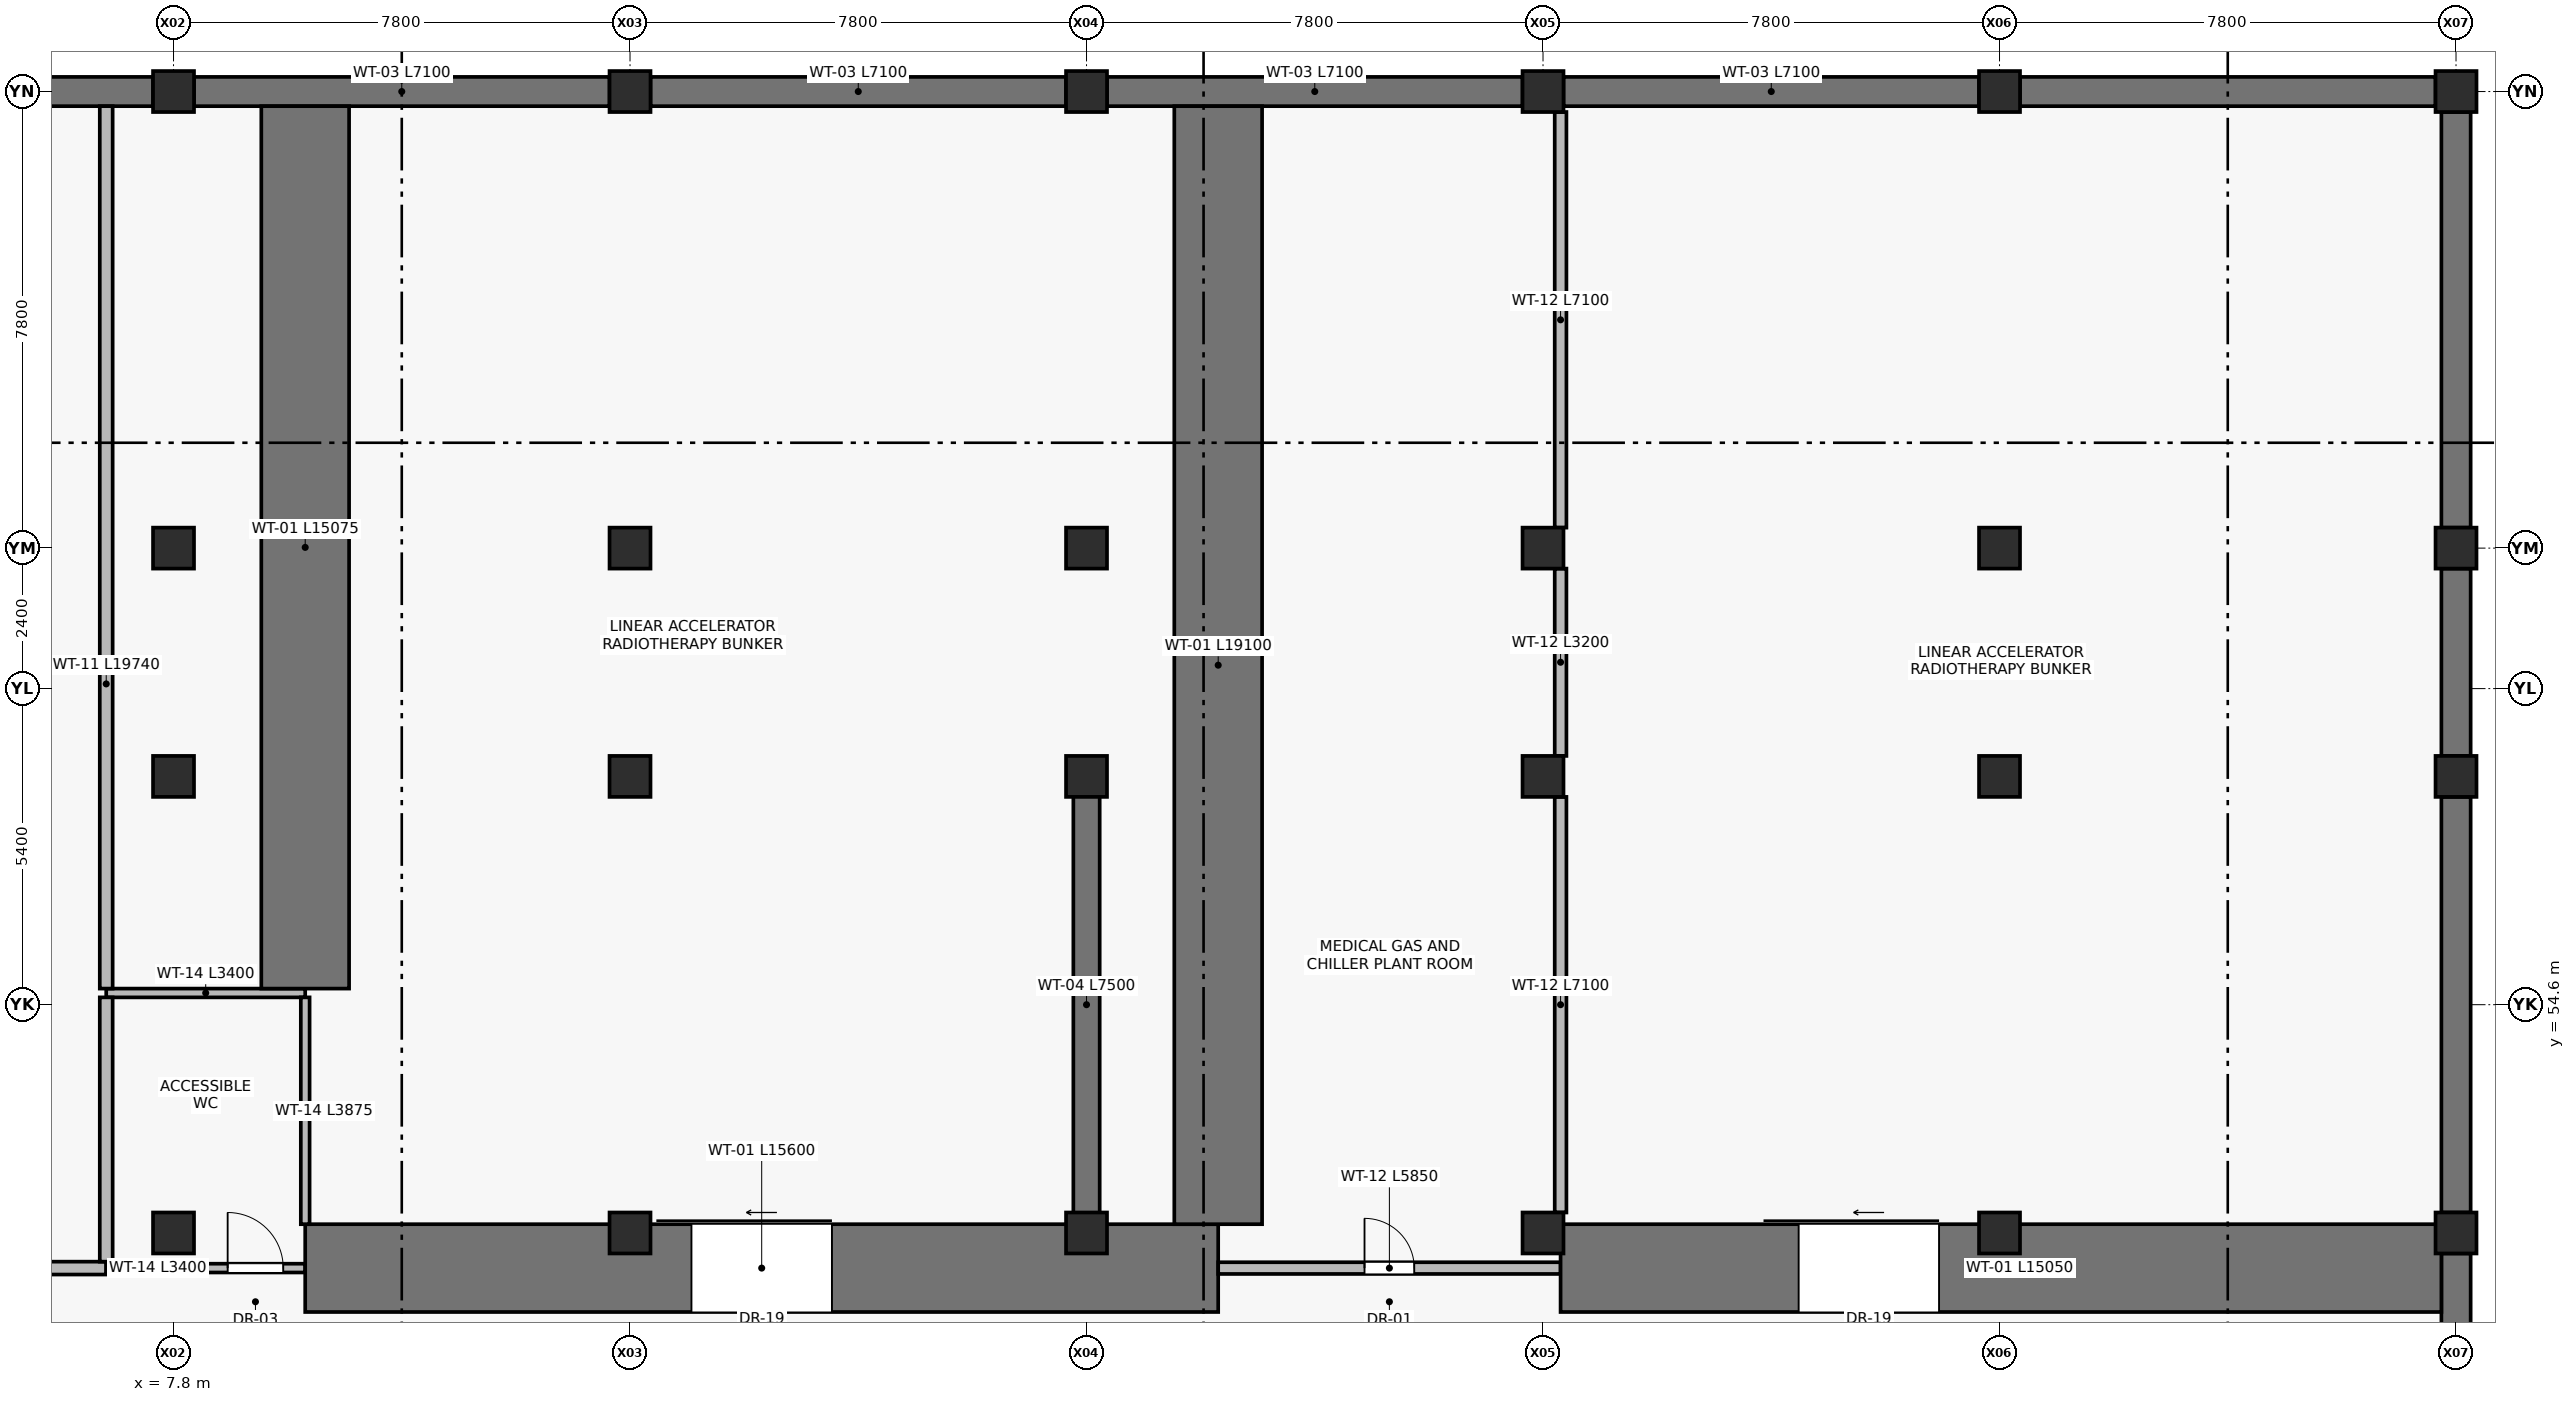
"""IFC4 building model, lengths in metres.
Left out: names, types, materials, properties, quantities, classifications, styles, units other than length and angle.
Written with IfcOpenShell. Run it as: python <this file> out.ifc"""

import sys

from ifc_helpers import new_model, si_unit, direction, frame, frame_2d, origin, origin_2d, place, context, subcontext, project, spatial, rectangle, extrude, element, fill, save


model = new_model("IFC4")
c1 = context("Model", 3, precision=1e-05, world=origin(), true_north=direction((0.0, 1.0)))
c2 = subcontext(c1, "Body", "Model", "MODEL_VIEW")
j1 = project(units=[si_unit("LENGTHUNIT", "METRE"), si_unit("PLANEANGLEUNIT", "RADIAN")], contexts=[c1])
p1 = place(None, origin())
s1 = spatial("IfcSite", under=j1, at=p1, CompositionType="ELEMENT")
p2 = place(p1, origin())
s2 = spatial("IfcBuilding", under=s1, at=p2, CompositionType="ELEMENT")
p3 = place(p2, frame((0.0, 0.0, -4.5)))
s3 = spatial("IfcBuildingStorey", under=s2, at=p3, CompositionType="ELEMENT", Elevation=-4.5)
for number, where, z_axis, x_axis in (
    (1, (7.8, 50.7, 0.0), (0.0, 0.0, 1.0), (1.0, 0.0, 0.0)),
    (2, (7.8, 58.5, 0.0), (0.0, 0.0, 1.0), (1.0, 0.0, 0.0)),
    (3, (7.8, 62.4, 0.0), (0.0, 0.0, 1.0), (1.0, 0.0, 0.0)),
    (4, (7.8, 70.2, 0.0), (0.0, 0.0, 1.0), (1.0, 0.0, 0.0)),
    (5, (15.6, 50.7, 0.0), (0.0, 0.0, 1.0), (1.0, 0.0, 0.0)),
    (6, (15.6, 58.5, 0.0), (0.0, 0.0, 1.0), (1.0, 0.0, 0.0)),
    (7, (15.6, 62.4, 0.0), (0.0, 0.0, 1.0), (1.0, 0.0, 0.0)),
    (8, (15.6, 70.2, 0.0), (0.0, 0.0, 1.0), (1.0, 0.0, 0.0)),
    (9, (23.4, 50.7, 0.0), (0.0, 0.0, 1.0), (1.0, 0.0, 0.0)),
    (10, (23.4, 58.5, 0.0), (0.0, 0.0, 1.0), (1.0, 0.0, 0.0)),
    (11, (23.4, 62.4, 0.0), (0.0, 0.0, 1.0), (1.0, 0.0, 0.0)),
    (12, (23.4, 70.2, 0.0), (0.0, 0.0, 1.0), (1.0, 0.0, 0.0)),
    (13, (31.2, 50.7, 0.0), (0.0, 0.0, 1.0), (1.0, 0.0, 0.0)),
    (14, (31.2, 58.5, 0.0), (0.0, 0.0, 1.0), (1.0, 0.0, 0.0)),
    (15, (31.2, 62.4, 0.0), (0.0, 0.0, 1.0), (1.0, 0.0, 0.0)),
    (16, (31.2, 70.2, 0.0), (0.0, 0.0, 1.0), (1.0, 0.0, 0.0)),
    (17, (39.0, 50.7, 0.0), (0.0, 0.0, 1.0), (1.0, 0.0, 0.0)),
    (18, (39.0, 58.5, 0.0), (0.0, 0.0, 1.0), (1.0, 0.0, 0.0)),
    (19, (39.0, 62.4, 0.0), (0.0, 0.0, 1.0), (1.0, 0.0, 0.0)),
    (20, (39.0, 70.2, 0.0), (0.0, 0.0, 1.0), (1.0, 0.0, 0.0)),
    (21, (46.8, 50.7, 0.0), (0.0, 0.0, 1.0), (1.0, 0.0, 0.0)),
    (22, (46.8, 58.5, 0.0), (0.0, 0.0, 1.0), (1.0, 0.0, 0.0)),
    (23, (46.8, 62.4, 0.0), (0.0, 0.0, 1.0), (1.0, 0.0, 0.0)),
    (24, (46.8, 70.2, 0.0), (0.0, 0.0, 1.0), (1.0, 0.0, 0.0)),
):
    element("IfcColumn", number, at=place(p3, frame(where, z_axis=z_axis, x_axis=x_axis)), inside=s3, PredefinedType="COLUMN", context=c2, shape_type="SweptSolid", body=[
        extrude(rectangle(XDim=0.7, YDim=0.7, at=origin_2d()), origin(), (0.0, 0.0, 1.0), 4.5),
    ])
p4 = place(p3, frame((0.35, 70.2, 0.0), z_axis=(0.0, 0.0, 1.0), x_axis=(1.0, 0.0, 0.0)))
e25 = element("IfcWall", 25, at=p4, inside=s3, PredefinedType="SOLIDWALL", context=c2, shape_type="SweptSolid", body=[
    extrude(rectangle(XDim=7.1, YDim=0.5, at=frame_2d((3.55, 0.0))), origin(), (0.0, 0.0, 1.0), 4.12),
])
for number, where, z_axis, x_axis in (
    (26, (8.15, 70.2, 0.0), (0.0, 0.0, 1.0), (1.0, 0.0, 0.0)),
    (27, (15.95, 70.2, 0.0), (0.0, 0.0, 1.0), (1.0, 0.0, 0.0)),
    (28, (23.75, 70.2, 0.0), (0.0, 0.0, 1.0), (1.0, 0.0, 0.0)),
):
    element("IfcWall", number, at=place(p3, frame(where, z_axis=z_axis, x_axis=x_axis)), inside=s3, PredefinedType="SOLIDWALL", context=c2, shape_type="SweptSolid", body=[
        extrude(rectangle(XDim=7.1, YDim=0.5, at=frame_2d((3.55, 0.0))), origin(), (0.0, 0.0, 1.0), 4.12),
    ])
for number, where, z_axis, x_axis in (
    (29, (31.55, 70.2, 0.0), (0.0, 0.0, 1.0), (1.0, 0.0, 0.0)),
    (30, (39.35, 70.2, 0.0), (0.0, 0.0, 1.0), (1.0, 0.0, 0.0)),
):
    element("IfcWall", number, at=place(p3, frame(where, z_axis=z_axis, x_axis=x_axis)), inside=s3, PredefinedType="SOLIDWALL", context=c2, shape_type="SweptSolid", body=[
        extrude(rectangle(XDim=7.1, YDim=0.5, at=frame_2d((3.55, 0.0))), origin(), (0.0, 0.0, 1.0), 4.12),
    ])
p5 = place(p3, frame((46.8, 69.85, 0.0), z_axis=(0.0, 0.0, 1.0), x_axis=(0.0, -1.0, 0.0)))
e31 = element("IfcWall", 31, at=p5, inside=s3, PredefinedType="SOLIDWALL", context=c2, shape_type="SweptSolid", body=[
    extrude(rectangle(XDim=7.1, YDim=0.5, at=frame_2d((3.55, 0.0))), origin(), (0.0, 0.0, 1.0), 4.12),
])
p6 = place(p3, frame((46.8, 62.05, 0.0), z_axis=(0.0, 0.0, 1.0), x_axis=(0.0, -1.0, 0.0)))
e32 = element("IfcWall", 32, at=p6, inside=s3, PredefinedType="SOLIDWALL", context=c2, shape_type="SweptSolid", body=[
    extrude(rectangle(XDim=3.2, YDim=0.5, at=frame_2d((1.6, 0.0))), origin(), (0.0, 0.0, 1.0), 4.12),
])
p7 = place(p3, frame((46.8, 58.15, 0.0), z_axis=(0.0, 0.0, 1.0), x_axis=(0.0, -1.0, 0.0)))
e33 = element("IfcWall", 33, at=p7, inside=s3, PredefinedType="SOLIDWALL", context=c2, shape_type="SweptSolid", body=[
    extrude(rectangle(XDim=7.1, YDim=0.5, at=frame_2d((3.55, 0.0))), origin(), (0.0, 0.0, 1.0), 4.12),
])
p8 = place(p3, frame((46.8, 50.35, 0.0), z_axis=(0.0, 0.0, 1.0), x_axis=(0.0, -1.0, 0.0)))
e34 = element("IfcWall", 34, at=p8, inside=s3, PredefinedType="SOLIDWALL", context=c2, shape_type="SweptSolid", body=[
    extrude(rectangle(XDim=7.1, YDim=0.5, at=frame_2d((3.55, 0.0))), origin(), (0.0, 0.0, 1.0), 4.12),
])
p9 = place(p3, frame((23.4, 50.85, 0.0), z_axis=(0.0, 0.0, 1.0), x_axis=(0.0, 1.0, 0.0)))
e35 = element("IfcWall", 35, at=p9, inside=s3, PredefinedType="SHEAR", context=c2, shape_type="SweptSolid", body=[
    extrude(rectangle(XDim=7.5, YDim=0.45, at=frame_2d((3.75, 0.0))), origin(), (0.0, 0.0, 1.0), 4.12),
])
p10 = place(p3, frame((0.25, 50.1, 0.0), z_axis=(0.0, 0.0, 1.0), x_axis=(1.0, 0.0, 0.0)))
e36 = element("IfcWall", 36, at=p10, inside=s3, PredefinedType="PARTITIONING", context=c2, shape_type="SweptSolid", body=[
    extrude(rectangle(XDim=6.4, YDim=0.22, at=frame_2d((3.2, 0.0))), origin(), (0.0, 0.0, 1.0), 4.12),
])
p11 = place(p10, frame((2.75, 0.0, 0.0)))
e37 = element("IfcOpeningElement", 37, at=p11, cuts=e36, PredefinedType="OPENING", context=c2, shape_type="SweptSolid", body=[
    extrude(rectangle(XDim=0.9, YDim=2.1, at=frame_2d((0.45, 1.05))), frame((0.0, 0.12, 0.0), z_axis=(0.0, -1.0, 0.0), x_axis=(1.0, 0.0, 0.0)), (0.0, 0.0, 1.0), 0.24),
])
p12 = place(p3, frame((6.65, 50.1, 0.0), z_axis=(0.0, 0.0, 1.0), x_axis=(1.0, 0.0, 0.0)))
e38 = element("IfcWall", 38, at=p12, inside=s3, PredefinedType="PARTITIONING", context=c2, shape_type="SweptSolid", body=[
    extrude(rectangle(XDim=3.4, YDim=0.15, at=frame_2d((1.7, 0.0))), origin(), (0.0, 0.0, 1.0), 4.12),
])
p13 = place(p12, frame((2.075, 0.0, 0.0)))
e39 = element("IfcOpeningElement", 39, at=p13, cuts=e38, PredefinedType="OPENING", context=c2, shape_type="SweptSolid", body=[
    extrude(rectangle(XDim=0.95, YDim=2.1, at=frame_2d((0.475, 1.05))), frame((0.0, 0.085, 0.0), z_axis=(0.0, -1.0, 0.0), x_axis=(1.0, 0.0, 0.0)), (0.0, 0.0, 1.0), 0.17),
])
p14 = place(p3, frame((6.65, 54.8, 0.0), z_axis=(0.0, 0.0, 1.0), x_axis=(1.0, 0.0, 0.0)))
e40 = element("IfcWall", 40, at=p14, inside=s3, PredefinedType="PARTITIONING", context=c2, shape_type="SweptSolid", body=[
    extrude(rectangle(XDim=3.4, YDim=0.15, at=frame_2d((1.7, 0.0))), origin(), (0.0, 0.0, 1.0), 4.12),
])
p15 = place(p3, frame((10.05, 50.1, 0.0), z_axis=(0.0, 0.0, 1.0), x_axis=(1.0, 0.0, 0.0)))
e41 = element("IfcWall", 41, at=p15, inside=s3, PredefinedType="SOLIDWALL", context=c2, shape_type="SweptSolid", body=[
    extrude(rectangle(XDim=15.6, YDim=1.5, at=frame_2d((7.8, 0.0))), origin(), (0.0, 0.0, 1.0), 4.12),
])
p16 = place(p15, frame((6.6, 0.0, 0.0)))
e42 = element("IfcOpeningElement", 42, at=p16, cuts=e41, PredefinedType="OPENING", context=c2, shape_type="SweptSolid", body=[
    extrude(rectangle(XDim=2.4, YDim=2.5, at=frame_2d((1.2, 1.25))), frame((0.0, 0.76, 0.0), z_axis=(0.0, -1.0, 0.0), x_axis=(1.0, 0.0, 0.0)), (0.0, 0.0, 1.0), 1.52),
])
p17 = place(p3, frame((25.65, 50.1, 0.0), z_axis=(0.0, 0.0, 1.0), x_axis=(1.0, 0.0, 0.0)))
e43 = element("IfcWall", 43, at=p17, inside=s3, PredefinedType="SOLIDWALL", context=c2, shape_type="SweptSolid", body=[
    extrude(rectangle(XDim=5.85, YDim=0.2, at=frame_2d((2.925, 0.0))), origin(), (0.0, 0.0, 1.0), 4.12),
])
p18 = place(p17, frame((2.5, 0.0, 0.0)))
e44 = element("IfcOpeningElement", 44, at=p18, cuts=e43, PredefinedType="OPENING", context=c2, shape_type="SweptSolid", body=[
    extrude(rectangle(XDim=0.85, YDim=2.1, at=frame_2d((0.425, 1.05))), frame((0.0, 0.11, 0.0), z_axis=(0.0, -1.0, 0.0), x_axis=(1.0, 0.0, 0.0)), (0.0, 0.0, 1.0), 0.22),
])
p19 = place(p3, frame((31.5, 50.1, 0.0), z_axis=(0.0, 0.0, 1.0), x_axis=(1.0, 0.0, 0.0)))
e45 = element("IfcWall", 45, at=p19, inside=s3, PredefinedType="SOLIDWALL", context=c2, shape_type="SweptSolid", body=[
    extrude(rectangle(XDim=15.05, YDim=1.5, at=frame_2d((7.525, 0.0))), origin(), (0.0, 0.0, 1.0), 4.12),
])
p20 = place(p19, frame((4.067, 0.0, 0.0)))
e46 = element("IfcOpeningElement", 46, at=p20, cuts=e45, PredefinedType="OPENING", context=c2, shape_type="SweptSolid", body=[
    extrude(rectangle(XDim=2.4, YDim=2.5, at=frame_2d((1.2, 1.25))), frame((0.0, 0.76, 0.0), z_axis=(0.0, -1.0, 0.0), x_axis=(1.0, 0.0, 0.0)), (0.0, 0.0, 1.0), 1.52),
])
p21 = place(p3, frame((6.65, 50.21, 0.0), z_axis=(0.0, 0.0, 1.0), x_axis=(0.0, 1.0, 0.0)))
e47 = element("IfcWall", 47, at=p21, inside=s3, PredefinedType="PARTITIONING", context=c2, shape_type="SweptSolid", body=[
    extrude(rectangle(XDim=4.515, YDim=0.22, at=frame_2d((2.258, 0.0))), origin(), (0.0, 0.0, 1.0), 4.12),
])
p22 = place(p3, frame((6.65, 54.875, 0.0), z_axis=(0.0, 0.0, 1.0), x_axis=(0.0, 1.0, 0.0)))
e48 = element("IfcWall", 48, at=p22, inside=s3, PredefinedType="PARTITIONING", context=c2, shape_type="SweptSolid", body=[
    extrude(rectangle(XDim=15.075, YDim=0.22, at=frame_2d((7.538, 0.0))), origin(), (0.0, 0.0, 1.0), 4.12),
])
p23 = place(p3, frame((10.05, 50.85, 0.0), z_axis=(0.0, 0.0, 1.0), x_axis=(0.0, 1.0, 0.0)))
e49 = element("IfcWall", 49, at=p23, inside=s3, PredefinedType="PARTITIONING", context=c2, shape_type="SweptSolid", body=[
    extrude(rectangle(XDim=3.875, YDim=0.15, at=frame_2d((1.938, 0.0))), origin(), (0.0, 0.0, 1.0), 3.76),
])
p24 = place(p3, frame((10.05, 54.875, 0.0), z_axis=(0.0, 0.0, 1.0), x_axis=(0.0, 1.0, 0.0)))
e50 = element("IfcWall", 50, at=p24, inside=s3, PredefinedType="SOLIDWALL", context=c2, shape_type="SweptSolid", body=[
    extrude(rectangle(XDim=15.075, YDim=1.5, at=frame_2d((7.538, 0.0))), origin(), (0.0, 0.0, 1.0), 4.12),
])
p25 = place(p3, frame((25.65, 50.85, 0.0), z_axis=(0.0, 0.0, 1.0), x_axis=(0.0, 1.0, 0.0)))
e51 = element("IfcWall", 51, at=p25, inside=s3, PredefinedType="SOLIDWALL", context=c2, shape_type="SweptSolid", body=[
    extrude(rectangle(XDim=19.1, YDim=1.5, at=frame_2d((9.55, 0.0))), origin(), (0.0, 0.0, 1.0), 4.12),
])
p26 = place(p3, frame((31.5, 51.05, 0.0), z_axis=(0.0, 0.0, 1.0), x_axis=(0.0, 1.0, 0.0)))
e52 = element("IfcWall", 52, at=p26, inside=s3, PredefinedType="SOLIDWALL", context=c2, shape_type="SweptSolid", body=[
    extrude(rectangle(XDim=7.1, YDim=0.2, at=frame_2d((3.55, 0.0))), origin(), (0.0, 0.0, 1.0), 3.67),
])
p27 = place(p3, frame((31.5, 58.85, 0.0), z_axis=(0.0, 0.0, 1.0), x_axis=(0.0, 1.0, 0.0)))
e53 = element("IfcWall", 53, at=p27, inside=s3, PredefinedType="SOLIDWALL", context=c2, shape_type="SweptSolid", body=[
    extrude(rectangle(XDim=3.2, YDim=0.2, at=frame_2d((1.6, 0.0))), origin(), (0.0, 0.0, 1.0), 3.67),
])
p28 = place(p3, frame((31.5, 62.75, 0.0), z_axis=(0.0, 0.0, 1.0), x_axis=(0.0, 1.0, 0.0)))
e54 = element("IfcWall", 54, at=p28, inside=s3, PredefinedType="SOLIDWALL", context=c2, shape_type="SweptSolid", body=[
    extrude(rectangle(XDim=7.1, YDim=0.2, at=frame_2d((3.55, 0.0))), origin(), (0.0, 0.0, 1.0), 3.67),
])
p29 = place(p13, origin())
e55 = element("IfcDoor", 55, at=p29, inside=s3, OperationType="SINGLE_SWING_LEFT", PredefinedType="DOOR", context=c2, shape_type="SweptSolid", body=[
    extrude(rectangle(XDim=0.95, YDim=2.1, at=frame_2d((0.475, 1.05))), frame((0.0, 0.025, 0.0), z_axis=(0.0, -1.0, 0.0), x_axis=(1.0, 0.0, 0.0)), (0.0, 0.0, 1.0), 0.05),
])
fill(e39, e55)
p30 = place(p16, origin())
e56 = element("IfcDoor", 56, at=p30, inside=s3, OperationType="SLIDING_TO_LEFT", PredefinedType="DOOR", context=c2, shape_type="SweptSolid", body=[
    extrude(rectangle(XDim=2.4, YDim=2.5, at=frame_2d((1.2, 1.25))), frame((0.0, 0.025, 0.0), z_axis=(0.0, -1.0, 0.0), x_axis=(1.0, 0.0, 0.0)), (0.0, 0.0, 1.0), 0.05),
])
fill(e42, e56)
p31 = place(p18, origin())
e57 = element("IfcDoor", 57, at=p31, inside=s3, OperationType="SINGLE_SWING_LEFT", PredefinedType="DOOR", context=c2, shape_type="SweptSolid", body=[
    extrude(rectangle(XDim=0.85, YDim=2.1, at=frame_2d((0.425, 1.05))), frame((0.0, 0.025, 0.0), z_axis=(0.0, -1.0, 0.0), x_axis=(1.0, 0.0, 0.0)), (0.0, 0.0, 1.0), 0.05),
])
fill(e44, e57)
p32 = place(p20, origin())
e58 = element("IfcDoor", 58, at=p32, inside=s3, OperationType="SLIDING_TO_LEFT", PredefinedType="DOOR", context=c2, shape_type="SweptSolid", body=[
    extrude(rectangle(XDim=2.4, YDim=2.5, at=frame_2d((1.2, 1.25))), frame((0.0, 0.025, 0.0), z_axis=(0.0, -1.0, 0.0), x_axis=(1.0, 0.0, 0.0)), (0.0, 0.0, 1.0), 0.05),
])
fill(e46, e58)
save(model, sys.argv[1])
